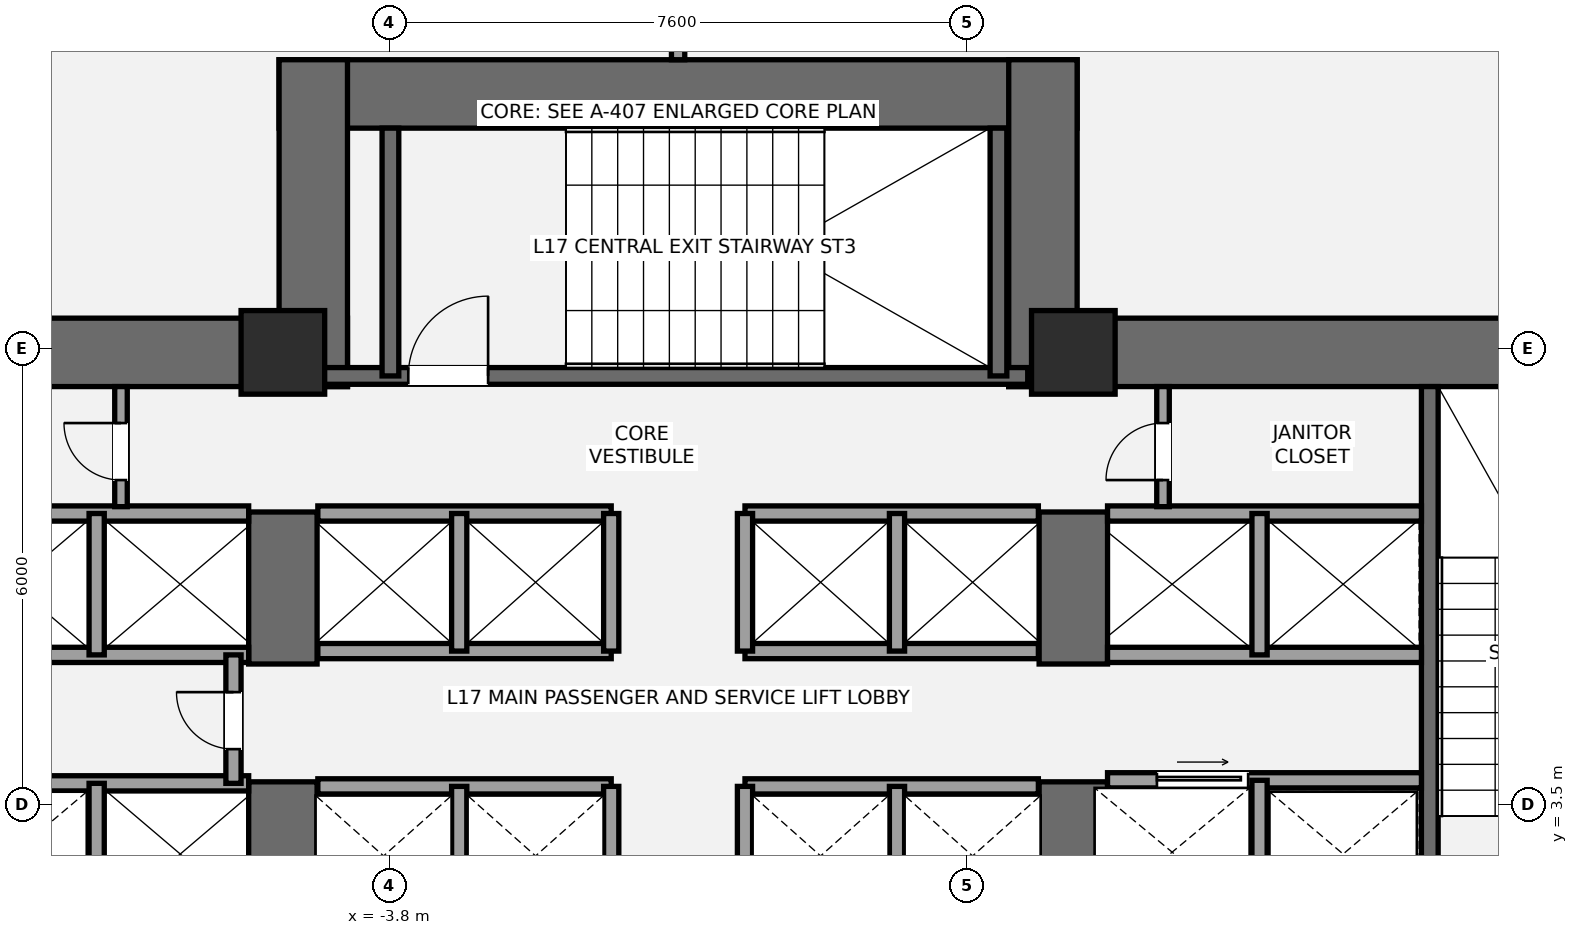
"""IFC4 building model, lengths in metres.
Left out: names, types, materials, properties, quantities, classifications, styles, units other than length and angle.
Written with IfcOpenShell. Run it as: python <this file> out.ifc"""

import sys

from ifc_helpers import new_model, si_unit, direction, frame, frame_2d, origin, origin_2d, place, context, subcontext, project, spatial, rectangle, extrude, element, fill, save


model = new_model("IFC4")
c1 = context("Model", 3, precision=1e-05, world=origin(), true_north=direction((0.0, 1.0)))
c2 = subcontext(c1, "Body", "Model", "MODEL_VIEW")
j1 = project(units=[si_unit("LENGTHUNIT", "METRE"), si_unit("PLANEANGLEUNIT", "RADIAN")], contexts=[c1])
p1 = place(None, origin())
s1 = spatial("IfcSite", under=j1, at=p1, CompositionType="ELEMENT")
p2 = place(p1, origin())
s2 = spatial("IfcBuilding", under=s1, at=p2, CompositionType="ELEMENT")
p3 = place(p2, frame((0.0, 0.0, 66.6)))
s3 = spatial("IfcBuildingStorey", under=s2, at=p3, CompositionType="ELEMENT", Elevation=66.6)
p4 = place(p3, frame((-14.05, 9.45, 0.0), z_axis=(0.0, 0.0, 1.0), x_axis=(1.0, 0.0, 0.0)))
e1 = element("IfcWall", 1, at=p4, inside=s3, PredefinedType="SHEAR", context=c2, shape_type="SweptSolid", body=[
    extrude(rectangle(XDim=9.7, YDim=0.9, at=frame_2d((4.85, 0.0))), origin(), (0.0, 0.0, 1.0), 3.6),
])
p5 = place(p3, frame((-5.2, 0.95, 0.0), z_axis=(0.0, 0.0, 1.0), x_axis=(0.0, 1.0, 0.0)))
e2 = element("IfcWall", 2, at=p5, inside=s3, PredefinedType="SHEAR", context=c2, shape_type="SweptSolid", body=[
    extrude(rectangle(XDim=2.85, YDim=0.9, at=frame_2d((1.425, 0.0))), origin(), (0.0, 0.0, 1.0), 3.6),
])
p6 = place(p3, frame((-5.2, 5.35, 0.0), z_axis=(0.0, 0.0, 1.0), x_axis=(0.0, 1.0, 0.0)))
e3 = element("IfcWall", 3, at=p6, inside=s3, PredefinedType="SHEAR", context=c2, shape_type="SweptSolid", body=[
    extrude(rectangle(XDim=2.0, YDim=0.9, at=frame_2d((1.0, 0.0))), origin(), (0.0, 0.0, 1.0), 3.6),
])
p7 = place(p3, frame((4.35, 9.45, 0.0), z_axis=(0.0, 0.0, 1.0), x_axis=(1.0, 0.0, 0.0)))
e4 = element("IfcWall", 4, at=p7, inside=s3, PredefinedType="SHEAR", context=c2, shape_type="SweptSolid", body=[
    extrude(rectangle(XDim=9.7, YDim=0.9, at=frame_2d((4.85, 0.0))), origin(), (0.0, 0.0, 1.0), 3.6),
])
p8 = place(p3, frame((5.2, 0.95, 0.0), z_axis=(0.0, 0.0, 1.0), x_axis=(0.0, 1.0, 0.0)))
e5 = element("IfcWall", 5, at=p8, inside=s3, PredefinedType="SHEAR", context=c2, shape_type="SweptSolid", body=[
    extrude(rectangle(XDim=2.85, YDim=0.9, at=frame_2d((1.425, 0.0))), origin(), (0.0, 0.0, 1.0), 3.6),
])
p9 = place(p3, frame((5.2, 5.35, 0.0), z_axis=(0.0, 0.0, 1.0), x_axis=(0.0, 1.0, 0.0)))
e6 = element("IfcWall", 6, at=p9, inside=s3, PredefinedType="SHEAR", context=c2, shape_type="SweptSolid", body=[
    extrude(rectangle(XDim=2.0, YDim=0.9, at=frame_2d((1.0, 0.0))), origin(), (0.0, 0.0, 1.0), 3.6),
])
p10 = place(p3, frame((9.89, 1.85, 0.0), z_axis=(0.0, 0.0, 1.0), x_axis=(0.0, 1.0, 0.0)))
e7 = element("IfcWall", 7, at=p10, inside=s3, PredefinedType="SHEAR", context=c2, shape_type="SweptSolid", body=[
    extrude(rectangle(XDim=7.15, YDim=0.22, at=frame_2d((3.575, 0.0))), origin(), (0.0, 0.0, 1.0), 3.6),
])
p11 = place(p3, frame((-5.25, 12.85, 0.0), z_axis=(0.0, 0.0, 1.0), x_axis=(1.0, 0.0, 0.0)))
e8 = element("IfcWall", 8, at=p11, inside=s3, PredefinedType="SHEAR", context=c2, shape_type="SweptSolid", body=[
    extrude(rectangle(XDim=10.5, YDim=0.9, at=frame_2d((5.25, 0.0))), origin(), (0.0, 0.0, 1.0), 3.6),
])
for number, where, z_axis, x_axis in (
    (9, (-4.8, 9.0, 0.0), (0.0, 0.0, 1.0), (0.0, 1.0, 0.0)),
    (10, (4.8, 9.0, 0.0), (0.0, 0.0, 1.0), (0.0, 1.0, 0.0)),
):
    element("IfcWall", number, at=place(p3, frame(where, z_axis=z_axis, x_axis=x_axis)), inside=s3, PredefinedType="SHEAR", context=c2, shape_type="SweptSolid", body=[
        extrude(rectangle(XDim=4.3, YDim=0.9, at=frame_2d((2.15, 0.0))), origin(), (0.0, 0.0, 1.0), 3.6),
    ])
p12 = place(p3, frame((-4.7, 9.14, 0.0), z_axis=(0.0, 0.0, 1.0), x_axis=(1.0, 0.0, 0.0)))
e11 = element("IfcWall", 11, at=p12, inside=s3, PredefinedType="SHEAR", context=c2, shape_type="SweptSolid", body=[
    extrude(rectangle(XDim=9.3, YDim=0.22, at=frame_2d((4.65, 0.0))), origin(), (0.0, 0.0, 1.0), 3.6),
])
p13 = place(p12, frame((1.15, 0.0, 0.0)))
e12 = element("IfcOpeningElement", 12, at=p13, cuts=e11, PredefinedType="OPENING", context=c2, shape_type="SweptSolid", body=[
    extrude(rectangle(XDim=1.05, YDim=2.15, at=frame_2d((0.525, 1.075))), frame((0.0, 0.12, 0.0), z_axis=(0.0, -1.0, 0.0), x_axis=(1.0, 0.0, 0.0)), (0.0, 0.0, 1.0), 0.24),
])
for number, where, z_axis, x_axis in (
    (13, (-3.785, 9.14, 0.0), (0.0, 0.0, 1.0), (0.0, 1.0, 0.0)),
    (14, (4.215, 9.14, 0.0), (0.0, 0.0, 1.0), (0.0, 1.0, 0.0)),
):
    element("IfcWall", number, at=place(p3, frame(where, z_axis=z_axis, x_axis=x_axis)), inside=s3, PredefinedType="SHEAR", context=c2, shape_type="SweptSolid", body=[
        extrude(rectangle(XDim=3.26, YDim=0.22, at=frame_2d((1.63, 0.0))), origin(), (0.0, 0.0, 1.0), 3.6),
    ])
for number, where, z_axis, x_axis in (
    (15, (-5.2, 9.45, 0.0), (0.0, 0.0, 1.0), (1.0, 0.0, 0.0)),
    (16, (5.2, 9.45, 0.0), (0.0, 0.0, 1.0), (1.0, 0.0, 0.0)),
):
    element("IfcColumn", number, at=place(p3, frame(where, z_axis=z_axis, x_axis=x_axis)), inside=s3, PredefinedType="COLUMN", context=c2, shape_type="SweptSolid", body=[
        extrude(rectangle(XDim=1.1, YDim=1.1, at=origin_2d()), origin(), (0.0, 0.0, 1.0), 3.6),
    ])
p14 = place(p3, frame((-9.78, 3.78, 0.0), z_axis=(0.0, 0.0, 1.0), x_axis=(1.0, 0.0, 0.0)))
e17 = element("IfcWall", 17, at=p14, inside=s3, PredefinedType="SOLIDWALL", context=c2, shape_type="SweptSolid", body=[
    extrude(rectangle(XDim=4.13, YDim=0.2, at=frame_2d((2.065, 0.0))), origin(), (0.0, 0.0, 1.0), 3.4),
])
p15 = place(p3, frame((-7.65, 1.85, 0.0), z_axis=(0.0, 0.0, 1.0), x_axis=(0.0, 1.0, 0.0)))
e18 = element("IfcWall", 18, at=p15, inside=s3, PredefinedType="SOLIDWALL", context=c2, shape_type="SweptSolid", body=[
    extrude(rectangle(XDim=1.93, YDim=0.2, at=frame_2d((0.965, 0.0))), origin(), (0.0, 0.0, 1.0), 3.4),
])
for number, where, z_axis, x_axis in (
    (19, (-9.78, 5.47, 0.0), (0.0, 0.0, 1.0), (1.0, 0.0, 0.0)),
    (20, (-9.78, 7.33, 0.0), (0.0, 0.0, 1.0), (1.0, 0.0, 0.0)),
):
    element("IfcWall", number, at=place(p3, frame(where, z_axis=z_axis, x_axis=x_axis)), inside=s3, PredefinedType="SOLIDWALL", context=c2, shape_type="SweptSolid", body=[
        extrude(rectangle(XDim=4.13, YDim=0.2, at=frame_2d((2.065, 0.0))), origin(), (0.0, 0.0, 1.0), 3.4),
    ])
p16 = place(p3, frame((-7.65, 5.47, 0.0), z_axis=(0.0, 0.0, 1.0), x_axis=(0.0, 1.0, 0.0)))
e21 = element("IfcWall", 21, at=p16, inside=s3, PredefinedType="SOLIDWALL", context=c2, shape_type="SweptSolid", body=[
    extrude(rectangle(XDim=1.86, YDim=0.2, at=frame_2d((0.93, 0.0))), origin(), (0.0, 0.0, 1.0), 3.4),
])
p17 = place(p3, frame((-5.85, 3.78, 0.0), z_axis=(0.0, 0.0, 1.0), x_axis=(0.0, 1.0, 0.0)))
e22 = element("IfcWall", 22, at=p17, inside=s3, PredefinedType="SOLIDWALL", context=c2, shape_type="SweptSolid", body=[
    extrude(rectangle(XDim=1.69, YDim=0.2, at=frame_2d((0.845, 0.0))), origin(), (0.0, 0.0, 1.0), 3.4),
])
p18 = place(p17, frame((0.45, 0.0, 0.0)))
e23 = element("IfcOpeningElement", 23, at=p18, cuts=e22, PredefinedType="OPENING", context=c2, shape_type="SweptSolid", body=[
    extrude(rectangle(XDim=0.75, YDim=2.1, at=frame_2d((0.375, 1.05))), frame((0.0, 0.11, 0.0), z_axis=(0.0, -1.0, 0.0), x_axis=(1.0, 0.0, 0.0)), (0.0, 0.0, 1.0), 0.22),
])
p19 = place(p3, frame((5.65, 3.82, 0.0), z_axis=(0.0, 0.0, 1.0), x_axis=(1.0, 0.0, 0.0)))
e24 = element("IfcWall", 24, at=p19, inside=s3, PredefinedType="SOLIDWALL", context=c2, shape_type="SweptSolid", body=[
    extrude(rectangle(XDim=4.13, YDim=0.2, at=frame_2d((2.065, 0.0))), origin(), (0.0, 0.0, 1.0), 3.4),
])
p20 = place(p19, frame((0.65, 0.0, 0.0)))
e25 = element("IfcOpeningElement", 25, at=p20, cuts=e24, PredefinedType="OPENING", context=c2, shape_type="SweptSolid", body=[
    extrude(rectangle(XDim=1.2, YDim=2.2, at=frame_2d((0.6, 1.1))), frame((0.0, 0.11, 0.0), z_axis=(0.0, -1.0, 0.0), x_axis=(1.0, 0.0, 0.0)), (0.0, 0.0, 1.0), 0.22),
])
p21 = place(p3, frame((7.65, 1.85, 0.0), z_axis=(0.0, 0.0, 1.0), x_axis=(0.0, 1.0, 0.0)))
e26 = element("IfcWall", 26, at=p21, inside=s3, PredefinedType="SOLIDWALL", context=c2, shape_type="SweptSolid", body=[
    extrude(rectangle(XDim=1.97, YDim=0.2, at=frame_2d((0.985, 0.0))), origin(), (0.0, 0.0, 1.0), 3.4),
])
for number, where, z_axis, x_axis in (
    (27, (5.65, 5.47, 0.0), (0.0, 0.0, 1.0), (1.0, 0.0, 0.0)),
    (28, (5.65, 7.33, 0.0), (0.0, 0.0, 1.0), (1.0, 0.0, 0.0)),
):
    element("IfcWall", number, at=place(p3, frame(where, z_axis=z_axis, x_axis=x_axis)), inside=s3, PredefinedType="SOLIDWALL", context=c2, shape_type="SweptSolid", body=[
        extrude(rectangle(XDim=4.13, YDim=0.2, at=frame_2d((2.065, 0.0))), origin(), (0.0, 0.0, 1.0), 3.4),
    ])
p22 = place(p3, frame((7.65, 5.47, 0.0), z_axis=(0.0, 0.0, 1.0), x_axis=(0.0, 1.0, 0.0)))
e29 = element("IfcWall", 29, at=p22, inside=s3, PredefinedType="SOLIDWALL", context=c2, shape_type="SweptSolid", body=[
    extrude(rectangle(XDim=1.86, YDim=0.2, at=frame_2d((0.93, 0.0))), origin(), (0.0, 0.0, 1.0), 3.4),
])
for number, where, z_axis, x_axis in (
    (30, (-4.74, 3.74, 0.0), (0.0, 0.0, 1.0), (1.0, 0.0, 0.0)),
    (31, (0.88, 3.74, 0.0), (0.0, 0.0, 1.0), (1.0, 0.0, 0.0)),
):
    element("IfcWall", number, at=place(p3, frame(where, z_axis=z_axis, x_axis=x_axis)), inside=s3, PredefinedType="SOLIDWALL", context=c2, shape_type="SweptSolid", body=[
        extrude(rectangle(XDim=3.86, YDim=0.2, at=frame_2d((1.93, 0.0))), origin(), (0.0, 0.0, 1.0), 3.4),
    ])
for number, where, z_axis, x_axis in (
    (32, (-2.88, 1.92, 0.0), (0.0, 0.0, 1.0), (0.0, 1.0, 0.0)),
    (33, (2.88, 1.92, 0.0), (0.0, 0.0, 1.0), (0.0, 1.0, 0.0)),
    (34, (-0.88, 1.92, 0.0), (0.0, 0.0, 1.0), (0.0, 1.0, 0.0)),
    (35, (0.88, 1.92, 0.0), (0.0, 0.0, 1.0), (0.0, 1.0, 0.0)),
):
    element("IfcWall", number, at=place(p3, frame(where, z_axis=z_axis, x_axis=x_axis)), inside=s3, PredefinedType="SOLIDWALL", context=c2, shape_type="SweptSolid", body=[
        extrude(rectangle(XDim=1.82, YDim=0.2, at=frame_2d((0.91, 0.0))), origin(), (0.0, 0.0, 1.0), 3.4),
    ])
for number, where, z_axis, x_axis in (
    (36, (-4.74, 5.52, 0.0), (0.0, 0.0, 1.0), (1.0, 0.0, 0.0)),
    (37, (0.88, 5.52, 0.0), (0.0, 0.0, 1.0), (1.0, 0.0, 0.0)),
    (38, (-4.74, 7.33, 0.0), (0.0, 0.0, 1.0), (1.0, 0.0, 0.0)),
    (39, (0.88, 7.33, 0.0), (0.0, 0.0, 1.0), (1.0, 0.0, 0.0)),
):
    element("IfcWall", number, at=place(p3, frame(where, z_axis=z_axis, x_axis=x_axis)), inside=s3, PredefinedType="SOLIDWALL", context=c2, shape_type="SweptSolid", body=[
        extrude(rectangle(XDim=3.86, YDim=0.2, at=frame_2d((1.93, 0.0))), origin(), (0.0, 0.0, 1.0), 3.4),
    ])
for number, where, z_axis, x_axis in (
    (40, (-2.88, 5.52, 0.0), (0.0, 0.0, 1.0), (0.0, 1.0, 0.0)),
    (41, (2.88, 5.52, 0.0), (0.0, 0.0, 1.0), (0.0, 1.0, 0.0)),
    (42, (-0.88, 5.52, 0.0), (0.0, 0.0, 1.0), (0.0, 1.0, 0.0)),
    (43, (0.88, 5.52, 0.0), (0.0, 0.0, 1.0), (0.0, 1.0, 0.0)),
):
    element("IfcWall", number, at=place(p3, frame(where, z_axis=z_axis, x_axis=x_axis)), inside=s3, PredefinedType="SOLIDWALL", context=c2, shape_type="SweptSolid", body=[
        extrude(rectangle(XDim=1.81, YDim=0.2, at=frame_2d((0.905, 0.0))), origin(), (0.0, 0.0, 1.0), 3.4),
    ])
p23 = place(p3, frame((-7.33, 7.42, 0.0), z_axis=(0.0, 0.0, 1.0), x_axis=(0.0, 1.0, 0.0)))
e44 = element("IfcWall", 44, at=p23, inside=s3, PredefinedType="PARTITIONING", context=c2, shape_type="SweptSolid", body=[
    extrude(rectangle(XDim=1.58, YDim=0.165, at=frame_2d((0.79, 0.0))), origin(), (0.0, 0.0, 1.0), 3.4),
])
p24 = place(p23, frame((0.35, 0.0, 0.0)))
e45 = element("IfcOpeningElement", 45, at=p24, cuts=e44, PredefinedType="OPENING", context=c2, shape_type="SweptSolid", body=[
    extrude(rectangle(XDim=0.75, YDim=2.1, at=frame_2d((0.375, 1.05))), frame((0.0, 0.093, 0.0), z_axis=(0.0, -1.0, 0.0), x_axis=(1.0, 0.0, 0.0)), (0.0, 0.0, 1.0), 0.185),
])
p25 = place(p3, frame((6.38, 7.42, 0.0), z_axis=(0.0, 0.0, 1.0), x_axis=(0.0, 1.0, 0.0)))
e46 = element("IfcWall", 46, at=p25, inside=s3, PredefinedType="PARTITIONING", context=c2, shape_type="SweptSolid", body=[
    extrude(rectangle(XDim=1.58, YDim=0.165, at=frame_2d((0.79, 0.0))), origin(), (0.0, 0.0, 1.0), 3.4),
])
p26 = place(p25, frame((0.35, 0.0, 0.0)))
e47 = element("IfcOpeningElement", 47, at=p26, cuts=e46, PredefinedType="OPENING", context=c2, shape_type="SweptSolid", body=[
    extrude(rectangle(XDim=0.75, YDim=2.1, at=frame_2d((0.375, 1.05))), frame((0.0, 0.093, 0.0), z_axis=(0.0, -1.0, 0.0), x_axis=(1.0, 0.0, 0.0)), (0.0, 0.0, 1.0), 0.185),
])
p27 = place(p3, frame((0.0, 13.3, 0.0), z_axis=(0.0, 0.0, 1.0), x_axis=(0.0, 1.0, 0.0)))
e48 = element("IfcWall", 48, at=p27, inside=s3, PredefinedType="PARTITIONING", context=c2, shape_type="SweptSolid", body=[
    extrude(rectangle(XDim=6.336, YDim=0.175, at=frame_2d((3.168, 0.0))), origin(), (0.0, 0.0, 1.0), 3.4),
])
p28 = place(p13, origin())
e49 = element("IfcDoor", 49, at=p28, inside=s3, OperationType="SINGLE_SWING_RIGHT", PredefinedType="DOOR", context=c2, shape_type="SweptSolid", body=[
    extrude(rectangle(XDim=1.05, YDim=2.15, at=frame_2d((0.525, 1.075))), frame((0.0, 0.025, 0.0), z_axis=(0.0, -1.0, 0.0), x_axis=(1.0, 0.0, 0.0)), (0.0, 0.0, 1.0), 0.05),
])
fill(e12, e49)
p29 = place(p18, origin())
e50 = element("IfcDoor", 50, at=p29, inside=s3, OperationType="SINGLE_SWING_RIGHT", PredefinedType="DOOR", context=c2, shape_type="SweptSolid", body=[
    extrude(rectangle(XDim=0.75, YDim=2.1, at=frame_2d((0.375, 1.05))), frame((0.0, 0.025, 0.0), z_axis=(0.0, -1.0, 0.0), x_axis=(1.0, 0.0, 0.0)), (0.0, 0.0, 1.0), 0.05),
])
fill(e23, e50)
p30 = place(p20, origin())
e51 = element("IfcDoor", 51, at=p30, inside=s3, OperationType="SLIDING_TO_RIGHT", PredefinedType="DOOR", context=c2, shape_type="SweptSolid", body=[
    extrude(rectangle(XDim=1.2, YDim=2.2, at=frame_2d((0.6, 1.1))), frame((0.0, 0.025, 0.0), z_axis=(0.0, -1.0, 0.0), x_axis=(1.0, 0.0, 0.0)), (0.0, 0.0, 1.0), 0.05),
])
fill(e25, e51)
p31 = place(p24, origin())
e52 = element("IfcDoor", 52, at=p31, inside=s3, OperationType="SINGLE_SWING_RIGHT", PredefinedType="DOOR", context=c2, shape_type="SweptSolid", body=[
    extrude(rectangle(XDim=0.75, YDim=2.1, at=frame_2d((0.375, 1.05))), frame((0.0, 0.025, 0.0), z_axis=(0.0, -1.0, 0.0), x_axis=(1.0, 0.0, 0.0)), (0.0, 0.0, 1.0), 0.05),
])
fill(e45, e52)
p32 = place(p26, origin())
e53 = element("IfcDoor", 53, at=p32, inside=s3, OperationType="SINGLE_SWING_LEFT", PredefinedType="DOOR", context=c2, shape_type="SweptSolid", body=[
    extrude(rectangle(XDim=0.75, YDim=2.1, at=frame_2d((0.375, 1.05))), frame((0.0, 0.025, 0.0), z_axis=(0.0, -1.0, 0.0), x_axis=(1.0, 0.0, 0.0)), (0.0, 0.0, 1.0), 0.05),
])
fill(e47, e53)
save(model, sys.argv[1])
